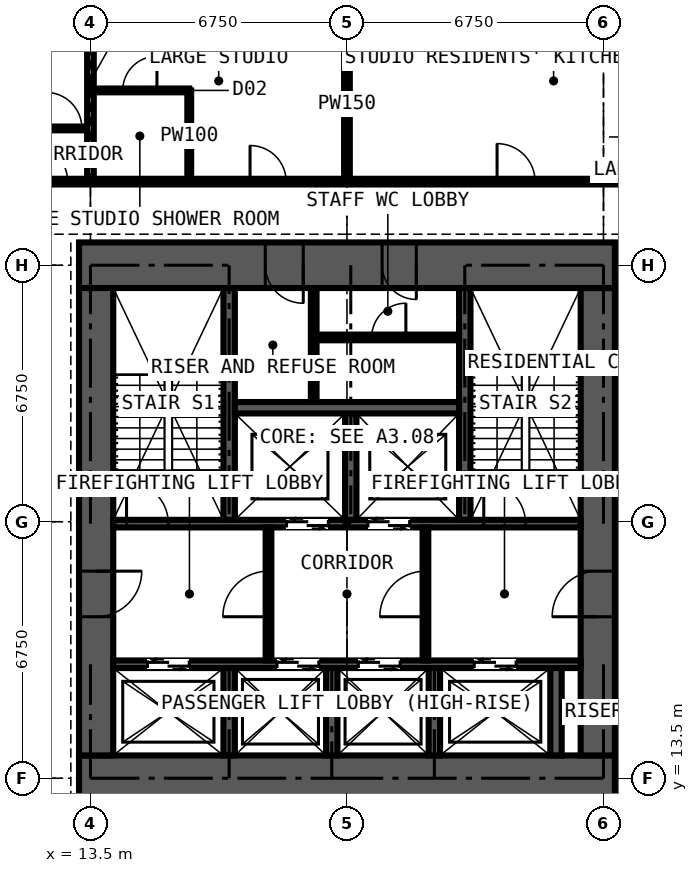
"""IFC4 building model, lengths in metres.
Left out: names, types, materials, properties, quantities, classifications, styles, units other than length and angle.
Written with IfcOpenShell. Run it as: python <this file> out.ifc"""

import sys

from ifc_helpers import new_model, si_unit, direction, frame, frame_2d, origin, place, context, subcontext, project, spatial, rectangle, extrude, element, fill, save


model = new_model("IFC4")
c1 = context("Model", 3, precision=1e-05, world=origin(), true_north=direction((0.0, 1.0)))
c2 = subcontext(c1, "Body", "Model", "MODEL_VIEW")
j1 = project(units=[si_unit("LENGTHUNIT", "METRE"), si_unit("PLANEANGLEUNIT", "RADIAN")], contexts=[c1])
p1 = place(None, origin())
s1 = spatial("IfcSite", under=j1, at=p1, CompositionType="ELEMENT")
p2 = place(p1, origin())
s2 = spatial("IfcBuilding", under=s1, at=p2, CompositionType="ELEMENT")
p3 = place(p2, frame((0.0, 0.0, 207.9)))
s3 = spatial("IfcBuildingStorey", under=s2, at=p3, CompositionType="ELEMENT", Elevation=207.9)
p4 = place(p3, frame((13.2, 13.5, 0.0), z_axis=(0.0, 0.0, 1.0), x_axis=(1.0, 0.0, 0.0)))
e1 = element("IfcWall", 1, at=p4, inside=s3, PredefinedType="SHEAR", context=c2, shape_type="SweptSolid", body=[
    extrude(rectangle(XDim=14.1, YDim=1.2, at=frame_2d((7.05, 0.0))), origin(), (0.0, 0.0, 1.0), 3.6),
])
p5 = place(p3, frame((26.85, 14.1, 0.0), z_axis=(0.0, 0.0, 1.0), x_axis=(0.0, 1.0, 0.0)))
e2 = element("IfcWall", 2, at=p5, inside=s3, PredefinedType="SHEAR", context=c2, shape_type="SweptSolid", body=[
    extrude(rectangle(XDim=12.3, YDim=0.9, at=frame_2d((6.15, 0.0))), origin(), (0.0, 0.0, 1.0), 3.6),
])
p6 = place(p5, frame((3.65, 0.0, 0.0)))
e3 = element("IfcOpeningElement", 3, at=p6, cuts=e2, PredefinedType="OPENING", context=c2, shape_type="SweptSolid", body=[
    extrude(rectangle(XDim=1.2, YDim=2.2, at=frame_2d((0.6, 1.1))), frame((0.0, 0.46, 0.0), z_axis=(0.0, -1.0, 0.0), x_axis=(1.0, 0.0, 0.0)), (0.0, 0.0, 1.0), 0.92),
])
p7 = place(p3, frame((27.3, 27.0, 0.0), z_axis=(0.0, 0.0, 1.0), x_axis=(-1.0, 0.0, 0.0)))
e4 = element("IfcWall", 4, at=p7, inside=s3, PredefinedType="SHEAR", context=c2, shape_type="SweptSolid", body=[
    extrude(rectangle(XDim=14.1, YDim=1.2, at=frame_2d((7.05, 0.0))), origin(), (0.0, 0.0, 1.0), 3.6),
])
p8 = place(p7, frame((5.225, 0.0, 0.0)))
e5 = element("IfcOpeningElement", 5, at=p8, cuts=e4, PredefinedType="OPENING", context=c2, shape_type="SweptSolid", body=[
    extrude(rectangle(XDim=0.9, YDim=2.2, at=frame_2d((0.45, 1.1))), frame((0.0, 0.61, 0.0), z_axis=(0.0, -1.0, 0.0), x_axis=(1.0, 0.0, 0.0)), (0.0, 0.0, 1.0), 1.22),
])
p9 = place(p7, frame((8.2, 0.0, 0.0)))
e6 = element("IfcOpeningElement", 6, at=p9, cuts=e4, PredefinedType="OPENING", context=c2, shape_type="SweptSolid", body=[
    extrude(rectangle(XDim=1.0, YDim=2.2, at=frame_2d((0.5, 1.1))), frame((0.0, 0.61, 0.0), z_axis=(0.0, -1.0, 0.0), x_axis=(1.0, 0.0, 0.0)), (0.0, 0.0, 1.0), 1.22),
])
p10 = place(p3, frame((13.65, 26.4, 0.0), z_axis=(0.0, 0.0, 1.0), x_axis=(0.0, -1.0, 0.0)))
e7 = element("IfcWall", 7, at=p10, inside=s3, PredefinedType="SHEAR", context=c2, shape_type="SweptSolid", body=[
    extrude(rectangle(XDim=12.3, YDim=0.9, at=frame_2d((6.15, 0.0))), origin(), (0.0, 0.0, 1.0), 3.6),
])
p11 = place(p10, frame((7.45, 0.0, 0.0)))
e8 = element("IfcOpeningElement", 8, at=p11, cuts=e7, PredefinedType="OPENING", context=c2, shape_type="SweptSolid", body=[
    extrude(rectangle(XDim=1.2, YDim=2.2, at=frame_2d((0.6, 1.1))), frame((0.0, 0.46, 0.0), z_axis=(0.0, -1.0, 0.0), x_axis=(1.0, 0.0, 0.0)), (0.0, 0.0, 1.0), 0.92),
])
p12 = place(p3, frame((14.1, 16.5, 0.0), z_axis=(0.0, 0.0, 1.0), x_axis=(1.0, 0.0, 0.0)))
e9 = element("IfcWall", 9, at=p12, inside=s3, PredefinedType="SHEAR", context=c2, shape_type="SweptSolid", body=[
    extrude(rectangle(XDim=12.3, YDim=0.2, at=frame_2d((6.15, 0.0))), origin(), (0.0, 0.0, 1.0), 3.6),
])
p13 = place(p12, frame((0.9, 0.0, 0.0)))
e10 = element("IfcOpeningElement", 10, at=p13, cuts=e9, PredefinedType="OPENING", context=c2, shape_type="SweptSolid", body=[
    extrude(rectangle(XDim=1.1, YDim=2.2, at=frame_2d((0.55, 1.1))), frame((0.0, 0.11, 0.0), z_axis=(0.0, -1.0, 0.0), x_axis=(1.0, 0.0, 0.0)), (0.0, 0.0, 1.0), 0.22),
])
p14 = place(p12, frame((4.31, 0.0, 0.0)))
e11 = element("IfcOpeningElement", 11, at=p14, cuts=e9, PredefinedType="OPENING", context=c2, shape_type="SweptSolid", body=[
    extrude(rectangle(XDim=1.1, YDim=2.2, at=frame_2d((0.55, 1.1))), frame((0.0, 0.11, 0.0), z_axis=(0.0, -1.0, 0.0), x_axis=(1.0, 0.0, 0.0)), (0.0, 0.0, 1.0), 0.22),
])
p15 = place(p12, frame((6.45, 0.0, 0.0)))
e12 = element("IfcOpeningElement", 12, at=p15, cuts=e9, PredefinedType="OPENING", context=c2, shape_type="SweptSolid", body=[
    extrude(rectangle(XDim=1.1, YDim=2.2, at=frame_2d((0.55, 1.1))), frame((0.0, 0.11, 0.0), z_axis=(0.0, -1.0, 0.0), x_axis=(1.0, 0.0, 0.0)), (0.0, 0.0, 1.0), 0.22),
])
p16 = place(p12, frame((9.5, 0.0, 0.0)))
e13 = element("IfcOpeningElement", 13, at=p16, cuts=e9, PredefinedType="OPENING", context=c2, shape_type="SweptSolid", body=[
    extrude(rectangle(XDim=1.1, YDim=2.2, at=frame_2d((0.55, 1.1))), frame((0.0, 0.11, 0.0), z_axis=(0.0, -1.0, 0.0), x_axis=(1.0, 0.0, 0.0)), (0.0, 0.0, 1.0), 0.22),
])
p17 = place(p3, frame((14.1, 20.2, 0.0), z_axis=(0.0, 0.0, 1.0), x_axis=(1.0, 0.0, 0.0)))
e14 = element("IfcWall", 14, at=p17, inside=s3, PredefinedType="SHEAR", context=c2, shape_type="SweptSolid", body=[
    extrude(rectangle(XDim=12.3, YDim=0.2, at=frame_2d((6.15, 0.0))), origin(), (0.0, 0.0, 1.0), 3.6),
])
p18 = place(p17, frame((4.56, 0.0, 0.0)))
e15 = element("IfcOpeningElement", 15, at=p18, cuts=e14, PredefinedType="OPENING", context=c2, shape_type="SweptSolid", body=[
    extrude(rectangle(XDim=1.1, YDim=2.2, at=frame_2d((0.55, 1.1))), frame((0.0, 0.11, 0.0), z_axis=(0.0, -1.0, 0.0), x_axis=(1.0, 0.0, 0.0)), (0.0, 0.0, 1.0), 0.22),
])
p19 = place(p17, frame((6.7, 0.0, 0.0)))
e16 = element("IfcOpeningElement", 16, at=p19, cuts=e14, PredefinedType="OPENING", context=c2, shape_type="SweptSolid", body=[
    extrude(rectangle(XDim=1.1, YDim=2.2, at=frame_2d((0.55, 1.1))), frame((0.0, 0.11, 0.0), z_axis=(0.0, -1.0, 0.0), x_axis=(1.0, 0.0, 0.0)), (0.0, 0.0, 1.0), 0.22),
])
p20 = place(p17, frame((0.35, 0.0, 0.0)))
e17 = element("IfcOpeningElement", 17, at=p20, cuts=e14, PredefinedType="OPENING", context=c2, shape_type="SweptSolid", body=[
    extrude(rectangle(XDim=1.1, YDim=2.2, at=frame_2d((0.55, 1.1))), frame((0.0, 0.11, 0.0), z_axis=(0.0, -1.0, 0.0), x_axis=(1.0, 0.0, 0.0)), (0.0, 0.0, 1.0), 0.22),
])
p21 = place(p17, frame((9.75, 0.0, 0.0)))
e18 = element("IfcOpeningElement", 18, at=p21, cuts=e14, PredefinedType="OPENING", context=c2, shape_type="SweptSolid", body=[
    extrude(rectangle(XDim=1.1, YDim=2.2, at=frame_2d((0.55, 1.1))), frame((0.0, 0.11, 0.0), z_axis=(0.0, -1.0, 0.0), x_axis=(1.0, 0.0, 0.0)), (0.0, 0.0, 1.0), 0.22),
])
for number, where, z_axis, x_axis in (
    (19, (17.15, 20.3, 0.0), (0.0, 0.0, 1.0), (0.0, 1.0, 0.0)),
    (20, (23.35, 20.3, 0.0), (0.0, 0.0, 1.0), (0.0, 1.0, 0.0)),
):
    element("IfcWall", number, at=place(p3, frame(where, z_axis=z_axis, x_axis=x_axis)), inside=s3, PredefinedType="SHEAR", context=c2, shape_type="SweptSolid", body=[
        extrude(rectangle(XDim=6.1, YDim=0.3, at=frame_2d((3.05, 0.0))), origin(), (0.0, 0.0, 1.0), 3.6),
    ])
p22 = place(p3, frame((20.35, 20.3, 0.0), z_axis=(0.0, 0.0, 1.0), x_axis=(0.0, 1.0, 0.0)))
e21 = element("IfcWall", 21, at=p22, inside=s3, PredefinedType="SHEAR", context=c2, shape_type="SweptSolid", body=[
    extrude(rectangle(XDim=2.8, YDim=0.3, at=frame_2d((1.4, 0.0))), origin(), (0.0, 0.0, 1.0), 3.6),
])
p23 = place(p3, frame((17.3, 23.25, 0.0), z_axis=(0.0, 0.0, 1.0), x_axis=(1.0, 0.0, 0.0)))
e22 = element("IfcWall", 22, at=p23, inside=s3, PredefinedType="SHEAR", context=c2, shape_type="SweptSolid", body=[
    extrude(rectangle(XDim=5.9, YDim=0.3, at=frame_2d((2.95, 0.0))), origin(), (0.0, 0.0, 1.0), 3.6),
])
for number, where, z_axis, x_axis in (
    (23, (17.15, 14.1, 0.0), (0.0, 0.0, 1.0), (0.0, 1.0, 0.0)),
    (24, (19.85, 14.1, 0.0), (0.0, 0.0, 1.0), (0.0, 1.0, 0.0)),
    (25, (22.55, 14.1, 0.0), (0.0, 0.0, 1.0), (0.0, 1.0, 0.0)),
    (26, (25.75, 14.1, 0.0), (0.0, 0.0, 1.0), (0.0, 1.0, 0.0)),
):
    element("IfcWall", number, at=place(p3, frame(where, z_axis=z_axis, x_axis=x_axis)), inside=s3, PredefinedType="SHEAR", context=c2, shape_type="SweptSolid", body=[
        extrude(rectangle(XDim=2.3, YDim=0.3, at=frame_2d((1.15, 0.0))), origin(), (0.0, 0.0, 1.0), 3.6),
    ])
p24 = place(p3, frame((18.185, 16.6, 0.0), z_axis=(0.0, 0.0, 1.0), x_axis=(0.0, 1.0, 0.0)))
e27 = element("IfcWall", 27, at=p24, inside=s3, PredefinedType="PARTITIONING", context=c2, shape_type="SweptSolid", body=[
    extrude(rectangle(XDim=3.5, YDim=0.15, at=frame_2d((1.75, 0.0))), origin(), (0.0, 0.0, 1.0), 3.375),
])
p25 = place(p24, frame((1.15, 0.0, 0.0)))
e28 = element("IfcOpeningElement", 28, at=p25, cuts=e27, PredefinedType="OPENING", context=c2, shape_type="SweptSolid", body=[
    extrude(rectangle(XDim=1.2, YDim=2.2, at=frame_2d((0.6, 1.1))), frame((0.0, 0.085, 0.0), z_axis=(0.0, -1.0, 0.0), x_axis=(1.0, 0.0, 0.0)), (0.0, 0.0, 1.0), 0.17),
])
p26 = place(p3, frame((22.315, 16.6, 0.0), z_axis=(0.0, 0.0, 1.0), x_axis=(0.0, 1.0, 0.0)))
e29 = element("IfcWall", 29, at=p26, inside=s3, PredefinedType="PARTITIONING", context=c2, shape_type="SweptSolid", body=[
    extrude(rectangle(XDim=3.5, YDim=0.15, at=frame_2d((1.75, 0.0))), origin(), (0.0, 0.0, 1.0), 3.375),
])
p27 = place(p26, frame((1.15, 0.0, 0.0)))
e30 = element("IfcOpeningElement", 30, at=p27, cuts=e29, PredefinedType="OPENING", context=c2, shape_type="SweptSolid", body=[
    extrude(rectangle(XDim=1.2, YDim=2.2, at=frame_2d((0.6, 1.1))), frame((0.0, 0.085, 0.0), z_axis=(0.0, -1.0, 0.0), x_axis=(1.0, 0.0, 0.0)), (0.0, 0.0, 1.0), 0.17),
])
p28 = place(p3, frame((19.375, 23.4, 0.0), z_axis=(0.0, 0.0, 1.0), x_axis=(0.0, 1.0, 0.0)))
e31 = element("IfcWall", 31, at=p28, inside=s3, PredefinedType="PARTITIONING", context=c2, shape_type="SweptSolid", body=[
    extrude(rectangle(XDim=3.0, YDim=0.15, at=frame_2d((1.5, 0.0))), origin(), (0.0, 0.0, 1.0), 3.375),
])
p29 = place(p3, frame((19.45, 25.1, 0.0), z_axis=(0.0, 0.0, 1.0), x_axis=(1.0, 0.0, 0.0)))
e32 = element("IfcWall", 32, at=p29, inside=s3, PredefinedType="PARTITIONING", context=c2, shape_type="SweptSolid", body=[
    extrude(rectangle(XDim=3.75, YDim=0.15, at=frame_2d((1.875, 0.0))), origin(), (0.0, 0.0, 1.0), 3.375),
])
p30 = place(p29, frame((1.45, 0.0, 0.0)))
e33 = element("IfcOpeningElement", 33, at=p30, cuts=e32, PredefinedType="OPENING", context=c2, shape_type="SweptSolid", body=[
    extrude(rectangle(XDim=0.9, YDim=2.2, at=frame_2d((0.45, 1.1))), frame((0.0, 0.085, 0.0), z_axis=(0.0, -1.0, 0.0), x_axis=(1.0, 0.0, 0.0)), (0.0, 0.0, 1.0), 0.17),
])
p31 = place(p3, frame((10.125, 30.6, 0.0), z_axis=(0.0, 0.0, 1.0), x_axis=(1.0, 0.0, 0.0)))
e34 = element("IfcWall", 34, at=p31, inside=s3, PredefinedType="PARTITIONING", context=c2, shape_type="SweptSolid", body=[
    extrude(rectangle(XDim=3.375, YDim=0.1, at=frame_2d((1.688, 0.0))), origin(), (0.0, 0.0, 1.0), 3.375),
])
p32 = place(p31, frame((2.2, 0.0, 0.0)))
e35 = element("IfcOpeningElement", 35, at=p32, cuts=e34, PredefinedType="OPENING", context=c2, shape_type="SweptSolid", body=[
    extrude(rectangle(XDim=0.95, YDim=2.2, at=frame_2d((0.475, 1.1))), frame((0.0, 0.06, 0.0), z_axis=(0.0, -1.0, 0.0), x_axis=(1.0, 0.0, 0.0)), (0.0, 0.0, 1.0), 0.12),
])
p33 = place(p3, frame((11.3, 29.2, 0.0), z_axis=(0.0, 0.0, 1.0), x_axis=(1.0, 0.0, 0.0)))
e36 = element("IfcWall", 36, at=p33, inside=s3, PredefinedType="PARTITIONING", context=c2, shape_type="SweptSolid", body=[
    extrude(rectangle(XDim=19.809, YDim=0.15, at=frame_2d((9.904, 0.0))), origin(), (0.0, 0.0, 1.0), 3.375),
])
p34 = place(p33, frame((12.9, 0.0, 0.0)))
e37 = element("IfcOpeningElement", 37, at=p34, cuts=e36, PredefinedType="OPENING", context=c2, shape_type="SweptSolid", body=[
    extrude(rectangle(XDim=1.0, YDim=2.2, at=frame_2d((0.5, 1.1))), frame((0.0, 0.085, 0.0), z_axis=(0.0, -1.0, 0.0), x_axis=(1.0, 0.0, 0.0)), (0.0, 0.0, 1.0), 0.17),
])
p35 = place(p33, frame((6.4, 0.0, 0.0)))
e38 = element("IfcOpeningElement", 38, at=p35, cuts=e36, PredefinedType="OPENING", context=c2, shape_type="SweptSolid", body=[
    extrude(rectangle(XDim=0.95, YDim=2.2, at=frame_2d((0.475, 1.1))), frame((0.0, 0.085, 0.0), z_axis=(0.0, -1.0, 0.0), x_axis=(1.0, 0.0, 0.0)), (0.0, 0.0, 1.0), 0.17),
])
p36 = place(p33, frame((0.6, 0.0, 0.0)))
e39 = element("IfcOpeningElement", 39, at=p36, cuts=e36, PredefinedType="OPENING", context=c2, shape_type="SweptSolid", body=[
    extrude(rectangle(XDim=1.0, YDim=2.2, at=frame_2d((0.5, 1.1))), frame((0.0, 0.085, 0.0), z_axis=(0.0, -1.0, 0.0), x_axis=(1.0, 0.0, 0.0)), (0.0, 0.0, 1.0), 0.17),
])
p37 = place(p3, frame((13.5, 29.2, 0.0), z_axis=(0.0, 0.0, 1.0), x_axis=(0.0, 1.0, 0.0)))
e40 = element("IfcWall", 40, at=p37, inside=s3, PredefinedType="PARTITIONING", context=c2, shape_type="SweptSolid", body=[
    extrude(rectangle(XDim=5.284, YDim=0.175, at=frame_2d((2.642, 0.0))), origin(), (0.0, 0.0, 1.0), 2.61),
])
p38 = place(p3, frame((13.5, 31.6, 0.0), z_axis=(0.0, 0.0, 1.0), x_axis=(1.0, 0.0, 0.0)))
e41 = element("IfcWall", 41, at=p38, inside=s3, PredefinedType="PARTITIONING", context=c2, shape_type="SweptSolid", body=[
    extrude(rectangle(XDim=2.6, YDim=0.1, at=frame_2d((1.3, 0.0))), origin(), (0.0, 0.0, 1.0), 3.375),
])
p39 = place(p38, frame((0.85, 0.0, 0.0)))
e42 = element("IfcOpeningElement", 42, at=p39, cuts=e41, PredefinedType="OPENING", context=c2, shape_type="SweptSolid", body=[
    extrude(rectangle(XDim=0.9, YDim=2.2, at=frame_2d((0.45, 1.1))), frame((0.0, 0.06, 0.0), z_axis=(0.0, -1.0, 0.0), x_axis=(1.0, 0.0, 0.0)), (0.0, 0.0, 1.0), 0.12),
])
p40 = place(p3, frame((16.1, 29.2, 0.0), z_axis=(0.0, 0.0, 1.0), x_axis=(0.0, 1.0, 0.0)))
e43 = element("IfcWall", 43, at=p40, inside=s3, PredefinedType="PARTITIONING", context=c2, shape_type="SweptSolid", body=[
    extrude(rectangle(XDim=2.4, YDim=0.1, at=frame_2d((1.2, 0.0))), origin(), (0.0, 0.0, 1.0), 3.375),
])
p41 = place(p3, frame((20.25, 29.2, 0.0), z_axis=(0.0, 0.0, 1.0), x_axis=(0.0, 1.0, 0.0)))
e44 = element("IfcWall", 44, at=p41, inside=s3, PredefinedType="PARTITIONING", context=c2, shape_type="SweptSolid", body=[
    extrude(rectangle(XDim=5.284, YDim=0.15, at=frame_2d((2.642, 0.0))), origin(), (0.0, 0.0, 1.0), 2.61),
])
p42 = place(p13, origin())
e45 = element("IfcDoor", 45, at=p42, inside=s3, OperationType="DOUBLE_DOOR_SLIDING", PredefinedType="DOOR", context=c2, shape_type="SweptSolid", body=[
    extrude(rectangle(XDim=1.1, YDim=2.2, at=frame_2d((0.55, 1.1))), frame((0.0, 0.025, 0.0), z_axis=(0.0, -1.0, 0.0), x_axis=(1.0, 0.0, 0.0)), (0.0, 0.0, 1.0), 0.05),
])
fill(e10, e45)
p43 = place(p14, origin())
e46 = element("IfcDoor", 46, at=p43, inside=s3, OperationType="DOUBLE_DOOR_SLIDING", PredefinedType="DOOR", context=c2, shape_type="SweptSolid", body=[
    extrude(rectangle(XDim=1.1, YDim=2.2, at=frame_2d((0.55, 1.1))), frame((0.0, 0.025, 0.0), z_axis=(0.0, -1.0, 0.0), x_axis=(1.0, 0.0, 0.0)), (0.0, 0.0, 1.0), 0.05),
])
fill(e11, e46)
p44 = place(p15, origin())
e47 = element("IfcDoor", 47, at=p44, inside=s3, OperationType="DOUBLE_DOOR_SLIDING", PredefinedType="DOOR", context=c2, shape_type="SweptSolid", body=[
    extrude(rectangle(XDim=1.1, YDim=2.2, at=frame_2d((0.55, 1.1))), frame((0.0, 0.025, 0.0), z_axis=(0.0, -1.0, 0.0), x_axis=(1.0, 0.0, 0.0)), (0.0, 0.0, 1.0), 0.05),
])
fill(e12, e47)
p45 = place(p16, origin())
e48 = element("IfcDoor", 48, at=p45, inside=s3, OperationType="DOUBLE_DOOR_SLIDING", PredefinedType="DOOR", context=c2, shape_type="SweptSolid", body=[
    extrude(rectangle(XDim=1.1, YDim=2.2, at=frame_2d((0.55, 1.1))), frame((0.0, 0.025, 0.0), z_axis=(0.0, -1.0, 0.0), x_axis=(1.0, 0.0, 0.0)), (0.0, 0.0, 1.0), 0.05),
])
fill(e13, e48)
p46 = place(p18, origin())
e49 = element("IfcDoor", 49, at=p46, inside=s3, OperationType="DOUBLE_DOOR_SLIDING", PredefinedType="DOOR", context=c2, shape_type="SweptSolid", body=[
    extrude(rectangle(XDim=1.1, YDim=2.2, at=frame_2d((0.55, 1.1))), frame((0.0, 0.025, 0.0), z_axis=(0.0, -1.0, 0.0), x_axis=(1.0, 0.0, 0.0)), (0.0, 0.0, 1.0), 0.05),
])
fill(e15, e49)
p47 = place(p19, origin())
e50 = element("IfcDoor", 50, at=p47, inside=s3, OperationType="DOUBLE_DOOR_SLIDING", PredefinedType="DOOR", context=c2, shape_type="SweptSolid", body=[
    extrude(rectangle(XDim=1.1, YDim=2.2, at=frame_2d((0.55, 1.1))), frame((0.0, 0.025, 0.0), z_axis=(0.0, -1.0, 0.0), x_axis=(1.0, 0.0, 0.0)), (0.0, 0.0, 1.0), 0.05),
])
fill(e16, e50)
p48 = place(p11, origin())
e51 = element("IfcDoor", 51, at=p48, inside=s3, OperationType="DOUBLE_DOOR_SINGLE_SWING", PredefinedType="DOOR", context=c2, shape_type="SweptSolid", body=[
    extrude(rectangle(XDim=1.2, YDim=2.2, at=frame_2d((0.6, 1.1))), frame((0.0, 0.025, 0.0), z_axis=(0.0, -1.0, 0.0), x_axis=(1.0, 0.0, 0.0)), (0.0, 0.0, 1.0), 0.05),
])
fill(e8, e51)
p49 = place(p6, origin())
e52 = element("IfcDoor", 52, at=p49, inside=s3, OperationType="DOUBLE_DOOR_SINGLE_SWING", PredefinedType="DOOR", context=c2, shape_type="SweptSolid", body=[
    extrude(rectangle(XDim=1.2, YDim=2.2, at=frame_2d((0.6, 1.1))), frame((0.0, 0.025, 0.0), z_axis=(0.0, -1.0, 0.0), x_axis=(1.0, 0.0, 0.0)), (0.0, 0.0, 1.0), 0.05),
])
fill(e3, e52)
p50 = place(p25, origin())
e53 = element("IfcDoor", 53, at=p50, inside=s3, OperationType="DOUBLE_DOOR_SINGLE_SWING", PredefinedType="DOOR", context=c2, shape_type="SweptSolid", body=[
    extrude(rectangle(XDim=1.2, YDim=2.2, at=frame_2d((0.6, 1.1))), frame((0.0, 0.025, 0.0), z_axis=(0.0, -1.0, 0.0), x_axis=(1.0, 0.0, 0.0)), (0.0, 0.0, 1.0), 0.05),
])
fill(e28, e53)
p51 = place(p27, origin())
e54 = element("IfcDoor", 54, at=p51, inside=s3, OperationType="DOUBLE_DOOR_SINGLE_SWING", PredefinedType="DOOR", context=c2, shape_type="SweptSolid", body=[
    extrude(rectangle(XDim=1.2, YDim=2.2, at=frame_2d((0.6, 1.1))), frame((0.0, 0.025, 0.0), z_axis=(0.0, -1.0, 0.0), x_axis=(1.0, 0.0, 0.0)), (0.0, 0.0, 1.0), 0.05),
])
fill(e30, e54)
p52 = place(p30, origin())
e55 = element("IfcDoor", 55, at=p52, inside=s3, OperationType="SINGLE_SWING_RIGHT", PredefinedType="DOOR", context=c2, shape_type="SweptSolid", body=[
    extrude(rectangle(XDim=0.9, YDim=2.2, at=frame_2d((0.45, 1.1))), frame((0.0, 0.025, 0.0), z_axis=(0.0, -1.0, 0.0), x_axis=(1.0, 0.0, 0.0)), (0.0, 0.0, 1.0), 0.05),
])
fill(e33, e55)
p53 = place(p8, origin())
e56 = element("IfcDoor", 56, at=p53, inside=s3, OperationType="SINGLE_SWING_LEFT", PredefinedType="DOOR", context=c2, shape_type="SweptSolid", body=[
    extrude(rectangle(XDim=0.9, YDim=2.2, at=frame_2d((0.45, 1.1))), frame((0.0, 0.4, 0.0), z_axis=(0.0, -1.0, 0.0), x_axis=(1.0, 0.0, 0.0)), (0.0, 0.0, 1.0), 0.8),
])
fill(e5, e56)
p54 = place(p9, origin())
e57 = element("IfcDoor", 57, at=p54, inside=s3, OperationType="SINGLE_SWING_LEFT", PredefinedType="DOOR", context=c2, shape_type="SweptSolid", body=[
    extrude(rectangle(XDim=1.0, YDim=2.2, at=frame_2d((0.5, 1.1))), frame((0.0, 0.025, 0.0), z_axis=(0.0, -1.0, 0.0), x_axis=(1.0, 0.0, 0.0)), (0.0, 0.0, 1.0), 0.05),
])
fill(e6, e57)
p55 = place(p20, origin())
e58 = element("IfcDoor", 58, at=p55, inside=s3, OperationType="SINGLE_SWING_LEFT", PredefinedType="DOOR", context=c2, shape_type="SweptSolid", body=[
    extrude(rectangle(XDim=1.1, YDim=2.2, at=frame_2d((0.55, 1.1))), frame((0.0, 0.025, 0.0), z_axis=(0.0, -1.0, 0.0), x_axis=(1.0, 0.0, 0.0)), (0.0, 0.0, 1.0), 0.05),
])
fill(e17, e58)
p56 = place(p21, origin())
e59 = element("IfcDoor", 59, at=p56, inside=s3, OperationType="SINGLE_SWING_LEFT", PredefinedType="DOOR", context=c2, shape_type="SweptSolid", body=[
    extrude(rectangle(XDim=1.1, YDim=2.2, at=frame_2d((0.55, 1.1))), frame((0.0, 0.025, 0.0), z_axis=(0.0, -1.0, 0.0), x_axis=(1.0, 0.0, 0.0)), (0.0, 0.0, 1.0), 0.05),
])
fill(e18, e59)
p57 = place(p34, origin())
e60 = element("IfcDoor", 60, at=p57, inside=s3, OperationType="SINGLE_SWING_LEFT", PredefinedType="DOOR", context=c2, shape_type="SweptSolid", body=[
    extrude(rectangle(XDim=1.0, YDim=2.2, at=frame_2d((0.5, 1.1))), frame((0.0, 0.025, 0.0), z_axis=(0.0, -1.0, 0.0), x_axis=(1.0, 0.0, 0.0)), (0.0, 0.0, 1.0), 0.05),
])
fill(e37, e60)
p58 = place(p35, origin())
e61 = element("IfcDoor", 61, at=p58, inside=s3, OperationType="SINGLE_SWING_LEFT", PredefinedType="DOOR", context=c2, shape_type="SweptSolid", body=[
    extrude(rectangle(XDim=0.95, YDim=2.2, at=frame_2d((0.475, 1.1))), frame((0.0, 0.025, 0.0), z_axis=(0.0, -1.0, 0.0), x_axis=(1.0, 0.0, 0.0)), (0.0, 0.0, 1.0), 0.05),
])
fill(e38, e61)
p59 = place(p39, origin())
e62 = element("IfcDoor", 62, at=p59, inside=s3, OperationType="SINGLE_SWING_RIGHT", PredefinedType="DOOR", context=c2, shape_type="SweptSolid", body=[
    extrude(rectangle(XDim=0.9, YDim=2.2, at=frame_2d((0.45, 1.1))), frame((0.0, 0.025, 0.0), z_axis=(0.0, -1.0, 0.0), x_axis=(1.0, 0.0, 0.0)), (0.0, 0.0, 1.0), 0.05),
])
fill(e42, e62)
p60 = place(p32, origin())
e63 = element("IfcDoor", 63, at=p60, inside=s3, OperationType="SINGLE_SWING_LEFT", PredefinedType="DOOR", context=c2, shape_type="SweptSolid", body=[
    extrude(rectangle(XDim=0.95, YDim=2.2, at=frame_2d((0.475, 1.1))), frame((0.0, 0.025, 0.0), z_axis=(0.0, -1.0, 0.0), x_axis=(1.0, 0.0, 0.0)), (0.0, 0.0, 1.0), 0.05),
])
fill(e35, e63)
p61 = place(p36, origin())
e64 = element("IfcDoor", 64, at=p61, inside=s3, OperationType="SINGLE_SWING_LEFT", PredefinedType="DOOR", context=c2, shape_type="SweptSolid", body=[
    extrude(rectangle(XDim=1.0, YDim=2.2, at=frame_2d((0.5, 1.1))), frame((0.0, 0.025, 0.0), z_axis=(0.0, -1.0, 0.0), x_axis=(1.0, 0.0, 0.0)), (0.0, 0.0, 1.0), 0.05),
])
fill(e39, e64)
save(model, sys.argv[1])
